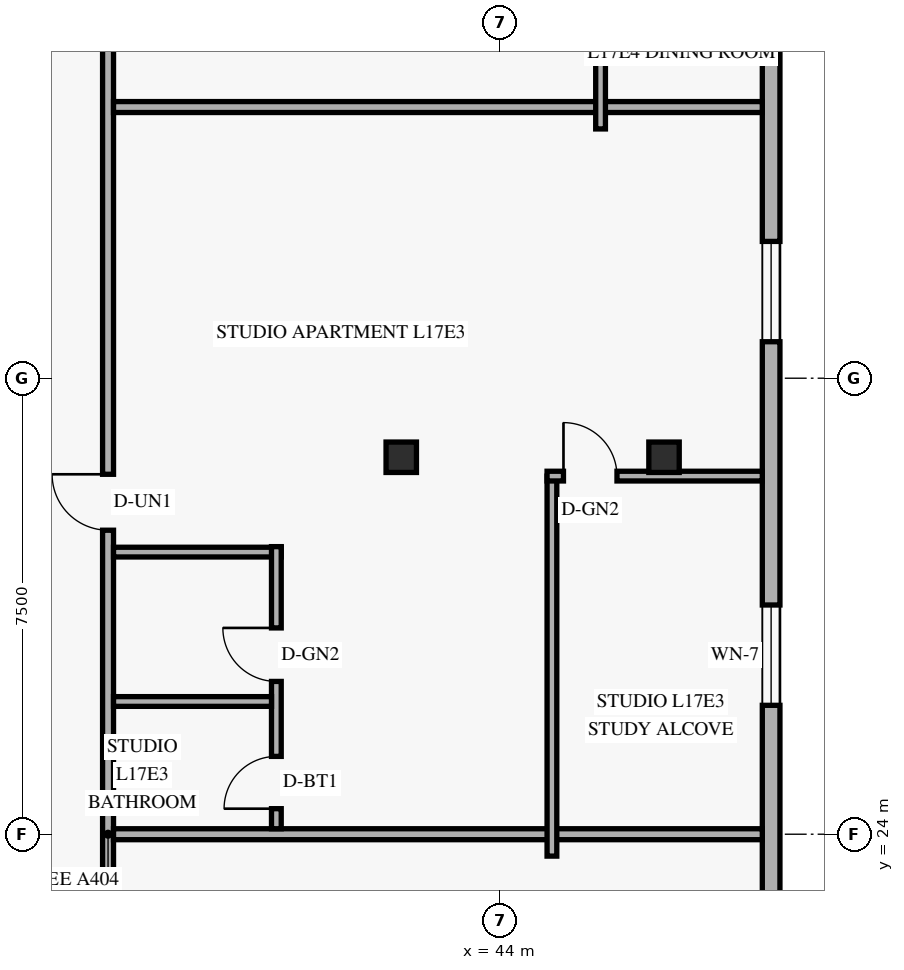
"""IFC4 building model, lengths in metres.
Left out: names, types, materials, properties, quantities, classifications, styles, units other than length and angle.
Written with IfcOpenShell. Run it as: python <this file> out.ifc"""

import sys

from ifc_helpers import new_model, si_unit, direction, frame, frame_2d, origin, origin_2d, place, context, subcontext, project, spatial, rectangle, hollow_rectangle, extrude, element, fill, save


model = new_model("IFC4")
c1 = context("Model", 3, precision=1e-05, world=origin(), true_north=direction((0.0, 1.0)))
c2 = subcontext(c1, "Body", "Model", "MODEL_VIEW")
j1 = project(units=[si_unit("LENGTHUNIT", "METRE"), si_unit("PLANEANGLEUNIT", "RADIAN")], contexts=[c1])
p1 = place(None, origin())
s1 = spatial("IfcSite", under=j1, at=p1, CompositionType="ELEMENT")
p2 = place(p1, origin())
s2 = spatial("IfcBuilding", under=s1, at=p2, CompositionType="ELEMENT")
p3 = place(p2, frame((0.0, 0.0, 67.8)))
s3 = spatial("IfcBuildingStorey", under=s2, at=p3, CompositionType="ELEMENT", Elevation=67.8)
p4 = place(p3, frame((42.309, 30.2, 0.0), z_axis=(0.034973505036, 0.0, 0.999388239847), x_axis=(0.0, 1.0, 0.0)))
e1 = element("IfcColumn", 1, at=p4, inside=s3, PredefinedType="COLUMN", context=c2, shape_type="SweptSolid", body=[
    extrude(hollow_rectangle(XDim=0.5, YDim=0.5, WallThickness=0.022, at=origin_2d()), origin(), (0.0, 0.0, 1.0), 3.602),
])
p5 = place(p3, frame((46.589, 30.2, 0.0), z_axis=(0.057955997462, 0.0, 0.998319138531), x_axis=(0.0, 1.0, 0.0)))
e2 = element("IfcColumn", 2, at=p5, inside=s3, PredefinedType="COLUMN", context=c2, shape_type="SweptSolid", body=[
    extrude(hollow_rectangle(XDim=0.5, YDim=0.5, WallThickness=0.022, at=origin_2d()), origin(), (0.0, 0.0, 1.0), 3.606),
])
p6 = place(p3, frame((48.455, 4.62, 0.0), z_axis=(0.0, 0.0, 1.0), x_axis=(0.0, 1.0, 0.0)))
e3 = element("IfcWall", 3, at=p6, inside=s3, PredefinedType="SOLIDWALL", context=c2, shape_type="SweptSolid", body=[
    extrude(rectangle(XDim=38.76, YDim=0.29, at=frame_2d((19.38, 0.0))), origin(), (0.0, 0.0, 1.0), 3.3),
])
p7 = place(p6, frame((2.885, 0.0, 0.85)))
e4 = element("IfcOpeningElement", 4, at=p7, cuts=e3, PredefinedType="OPENING", context=c2, shape_type="SweptSolid", body=[
    extrude(rectangle(XDim=1.65, YDim=1.6, at=frame_2d((0.825, 0.8))), frame((0.0, 0.155, 0.0), z_axis=(0.0, -1.0, 0.0), x_axis=(1.0, 0.0, 0.0)), (0.0, 0.0, 1.0), 0.31),
])
p8 = place(p6, frame((9.54, 0.0, 0.85)))
e5 = element("IfcOpeningElement", 5, at=p8, cuts=e3, PredefinedType="OPENING", context=c2, shape_type="SweptSolid", body=[
    extrude(rectangle(XDim=1.65, YDim=1.6, at=frame_2d((0.825, 0.8))), frame((0.0, 0.155, 0.0), z_axis=(0.0, -1.0, 0.0), x_axis=(1.0, 0.0, 0.0)), (0.0, 0.0, 1.0), 0.31),
])
p9 = place(p6, frame((15.52, 0.0, 0.85)))
e6 = element("IfcOpeningElement", 6, at=p9, cuts=e3, PredefinedType="OPENING", context=c2, shape_type="SweptSolid", body=[
    extrude(rectangle(XDim=1.65, YDim=1.6, at=frame_2d((0.825, 0.8))), frame((0.0, 0.155, 0.0), z_axis=(0.0, -1.0, 0.0), x_axis=(1.0, 0.0, 0.0)), (0.0, 0.0, 1.0), 0.31),
])
p10 = place(p6, frame((21.5, 0.0, 0.85)))
e7 = element("IfcOpeningElement", 7, at=p10, cuts=e3, PredefinedType="OPENING", context=c2, shape_type="SweptSolid", body=[
    extrude(rectangle(XDim=1.65, YDim=1.6, at=frame_2d((0.825, 0.8))), frame((0.0, 0.155, 0.0), z_axis=(0.0, -1.0, 0.0), x_axis=(1.0, 0.0, 0.0)), (0.0, 0.0, 1.0), 0.31),
])
p11 = place(p6, frame((27.48, 0.0, 0.85)))
e8 = element("IfcOpeningElement", 8, at=p11, cuts=e3, PredefinedType="OPENING", context=c2, shape_type="SweptSolid", body=[
    extrude(rectangle(XDim=1.65, YDim=1.6, at=frame_2d((0.825, 0.8))), frame((0.0, 0.155, 0.0), z_axis=(0.0, -1.0, 0.0), x_axis=(1.0, 0.0, 0.0)), (0.0, 0.0, 1.0), 0.31),
])
p12 = place(p6, frame((34.225, 0.0, 0.85)))
e9 = element("IfcOpeningElement", 9, at=p12, cuts=e3, PredefinedType="OPENING", context=c2, shape_type="SweptSolid", body=[
    extrude(rectangle(XDim=1.65, YDim=1.6, at=frame_2d((0.825, 0.8))), frame((0.0, 0.155, 0.0), z_axis=(0.0, -1.0, 0.0), x_axis=(1.0, 0.0, 0.0)), (0.0, 0.0, 1.0), 0.31),
])
p13 = place(p3, frame((37.55, 1.29, 0.0), z_axis=(0.0, 0.0, 1.0), x_axis=(0.0, 1.0, 0.0)))
e10 = element("IfcWall", 10, at=p13, inside=s3, PredefinedType="STANDARD", context=c2, shape_type="SweptSolid", body=[
    extrude(rectangle(XDim=45.42, YDim=0.18, at=frame_2d((22.71, 0.0))), origin(), (0.0, 0.0, 1.0), 2.589),
])
p14 = place(p13, frame((4.81, 0.0, 0.0)))
e11 = element("IfcOpeningElement", 11, at=p14, cuts=e10, PredefinedType="OPENING", context=c2, shape_type="SweptSolid", body=[
    extrude(rectangle(XDim=0.92, YDim=2.15, at=frame_2d((0.46, 1.075))), frame((0.0, 0.1, 0.0), z_axis=(0.0, -1.0, 0.0), x_axis=(1.0, 0.0, 0.0)), (0.0, 0.0, 1.0), 0.2),
])
p15 = place(p13, frame((15.75, 0.0, 0.0)))
e12 = element("IfcOpeningElement", 12, at=p15, cuts=e10, PredefinedType="OPENING", context=c2, shape_type="SweptSolid", body=[
    extrude(rectangle(XDim=0.92, YDim=2.15, at=frame_2d((0.46, 1.075))), frame((0.0, 0.1, 0.0), z_axis=(0.0, -1.0, 0.0), x_axis=(1.0, 0.0, 0.0)), (0.0, 0.0, 1.0), 0.2),
])
p16 = place(p13, frame((27.71, 0.0, 0.0)))
e13 = element("IfcOpeningElement", 13, at=p16, cuts=e10, PredefinedType="OPENING", context=c2, shape_type="SweptSolid", body=[
    extrude(rectangle(XDim=0.92, YDim=2.15, at=frame_2d((0.46, 1.075))), frame((0.0, 0.1, 0.0), z_axis=(0.0, -1.0, 0.0), x_axis=(1.0, 0.0, 0.0)), (0.0, 0.0, 1.0), 0.2),
])
p17 = place(p13, frame((36.422, 0.0, 0.0)))
e14 = element("IfcOpeningElement", 14, at=p17, cuts=e10, PredefinedType="OPENING", context=c2, shape_type="SweptSolid", body=[
    extrude(rectangle(XDim=0.92, YDim=2.15, at=frame_2d((0.46, 1.075))), frame((0.0, 0.1, 0.0), z_axis=(0.0, -1.0, 0.0), x_axis=(1.0, 0.0, 0.0)), (0.0, 0.0, 1.0), 0.2),
])
p18 = place(p3, frame((37.64, 24.0, 0.0), z_axis=(0.0, 0.0, 1.0), x_axis=(1.0, 0.0, 0.0)))
e15 = element("IfcWall", 15, at=p18, inside=s3, PredefinedType="PARTITIONING", context=c2, shape_type="SweptSolid", body=[
    extrude(rectangle(XDim=10.67, YDim=0.18, at=frame_2d((5.335, 0.0))), origin(), (0.0, 0.0, 1.0), 2.589),
])
p19 = place(p3, frame((37.64, 28.64, 0.0), z_axis=(0.0, 0.0, 1.0), x_axis=(1.0, 0.0, 0.0)))
e16 = element("IfcWall", 16, at=p19, inside=s3, PredefinedType="PLUMBINGWALL", context=c2, shape_type="SweptSolid", body=[
    extrude(rectangle(XDim=2.758, YDim=0.16, at=frame_2d((1.379, 0.0))), origin(), (0.0, 0.0, 1.0), 3.3),
])
p20 = place(p3, frame((40.318, 24.09, 0.0), z_axis=(0.0, 0.0, 1.0), x_axis=(0.0, 1.0, 0.0)))
e17 = element("IfcWall", 17, at=p20, inside=s3, PredefinedType="PLUMBINGWALL", context=c2, shape_type="SweptSolid", body=[
    extrude(rectangle(XDim=4.64, YDim=0.16, at=frame_2d((2.32, 0.0))), origin(), (0.0, 0.0, 1.0), 3.3),
])
p21 = place(p20, frame((0.33, 0.0, 0.0)))
e18 = element("IfcOpeningElement", 18, at=p21, cuts=e17, PredefinedType="OPENING", context=c2, shape_type="SweptSolid", body=[
    extrude(rectangle(XDim=0.86, YDim=2.12, at=frame_2d((0.43, 1.06))), frame((0.0, 0.09, 0.0), z_axis=(0.0, -1.0, 0.0), x_axis=(1.0, 0.0, 0.0)), (0.0, 0.0, 1.0), 0.18),
])
p22 = place(p20, frame((2.423, 0.0, 0.0)))
e19 = element("IfcOpeningElement", 19, at=p22, cuts=e17, PredefinedType="OPENING", context=c2, shape_type="SweptSolid", body=[
    extrude(rectangle(XDim=0.88, YDim=2.12, at=frame_2d((0.44, 1.06))), frame((0.0, 0.09, 0.0), z_axis=(0.0, -1.0, 0.0), x_axis=(1.0, 0.0, 0.0)), (0.0, 0.0, 1.0), 0.18),
])
p23 = place(p3, frame((37.64, 26.183, 0.0), z_axis=(0.0, 0.0, 1.0), x_axis=(1.0, 0.0, 0.0)))
e20 = element("IfcWall", 20, at=p23, inside=s3, PredefinedType="PLUMBINGWALL", context=c2, shape_type="SweptSolid", body=[
    extrude(rectangle(XDim=2.598, YDim=0.16, at=frame_2d((1.299, 0.0))), origin(), (0.0, 0.0, 1.0), 3.3),
])
p24 = place(p3, frame((44.85, 23.64, 0.0), z_axis=(0.0, 0.0, 1.0), x_axis=(0.0, 1.0, 0.0)))
e21 = element("IfcWall", 21, at=p24, inside=s3, PredefinedType="PARTITIONING", context=c2, shape_type="SweptSolid", body=[
    extrude(rectangle(XDim=6.25, YDim=0.16, at=frame_2d((3.125, 0.0))), origin(), (0.0, 0.0, 1.0), 3.3),
])
p25 = place(p3, frame((44.77, 29.89, 0.0), z_axis=(0.0, 0.0, 1.0), x_axis=(1.0, 0.0, 0.0)))
e22 = element("IfcWall", 22, at=p25, inside=s3, PredefinedType="PARTITIONING", context=c2, shape_type="SweptSolid", body=[
    extrude(rectangle(XDim=3.54, YDim=0.16, at=frame_2d((1.77, 0.0))), origin(), (0.0, 0.0, 1.0), 2.749),
])
p26 = place(p25, frame((0.27, 0.0, 0.0)))
e23 = element("IfcOpeningElement", 23, at=p26, cuts=e22, PredefinedType="OPENING", context=c2, shape_type="SweptSolid", body=[
    extrude(rectangle(XDim=0.88, YDim=2.12, at=frame_2d((0.44, 1.06))), frame((0.0, 0.09, 0.0), z_axis=(0.0, -1.0, 0.0), x_axis=(1.0, 0.0, 0.0)), (0.0, 0.0, 1.0), 0.18),
])
p27 = place(p3, frame((37.64, 35.96, 0.0), z_axis=(0.0, 0.0, 1.0), x_axis=(1.0, 0.0, 0.0)))
e24 = element("IfcWall", 24, at=p27, inside=s3, PredefinedType="PARTITIONING", context=c2, shape_type="SweptSolid", body=[
    extrude(rectangle(XDim=10.67, YDim=0.18, at=frame_2d((5.335, 0.0))), origin(), (0.0, 0.0, 1.0), 2.589),
])
p28 = place(p3, frame((45.65, 35.6, 0.0), z_axis=(0.0, 0.0, 1.0), x_axis=(0.0, 1.0, 0.0)))
e25 = element("IfcWall", 25, at=p28, inside=s3, PredefinedType="PARTITIONING", context=c2, shape_type="SweptSolid", body=[
    extrude(rectangle(XDim=8.256, YDim=0.16, at=frame_2d((4.128, 0.0))), origin(), (0.0, 0.0, 1.0), 2.589),
])
p29 = place(p28, frame((3.788, 0.0, 0.0)))
e26 = element("IfcOpeningElement", 26, at=p29, cuts=e25, PredefinedType="OPENING", context=c2, shape_type="SweptSolid", body=[
    extrude(rectangle(XDim=0.95, YDim=2.15, at=frame_2d((0.475, 1.075))), frame((0.0, 0.09, 0.0), z_axis=(0.0, -1.0, 0.0), x_axis=(1.0, 0.0, 0.0)), (0.0, 0.0, 1.0), 0.18),
])
p30 = place(p10, origin())
e27 = element("IfcWindow", 27, at=p30, inside=s3, PartitioningType="SINGLE_PANEL", PredefinedType="WINDOW", context=c2, shape_type="SweptSolid", body=[
    extrude(rectangle(XDim=1.65, YDim=1.6, at=frame_2d((0.825, 0.8))), frame((0.0, 0.03, 0.0), z_axis=(0.0, -1.0, 0.0), x_axis=(1.0, 0.0, 0.0)), (0.0, 0.0, 1.0), 0.06),
])
fill(e7, e27)
p31 = place(p11, origin())
e28 = element("IfcWindow", 28, at=p31, inside=s3, PartitioningType="SINGLE_PANEL", PredefinedType="WINDOW", context=c2, shape_type="SweptSolid", body=[
    extrude(rectangle(XDim=1.65, YDim=1.6, at=frame_2d((0.825, 0.8))), frame((0.0, 0.03, 0.0), z_axis=(0.0, -1.0, 0.0), x_axis=(1.0, 0.0, 0.0)), (0.0, 0.0, 1.0), 0.06),
])
fill(e8, e28)
p32 = place(p26, origin())
e29 = element("IfcDoor", 29, at=p32, inside=s3, OperationType="SINGLE_SWING_LEFT", PredefinedType="DOOR", context=c2, shape_type="SweptSolid", body=[
    extrude(rectangle(XDim=0.88, YDim=2.12, at=frame_2d((0.44, 1.06))), frame((0.0, 0.025, 0.0), z_axis=(0.0, -1.0, 0.0), x_axis=(1.0, 0.0, 0.0)), (0.0, 0.0, 1.0), 0.05),
])
fill(e23, e29)
p33 = place(p16, origin())
e30 = element("IfcDoor", 30, at=p33, inside=s3, OperationType="SINGLE_SWING_RIGHT", PredefinedType="DOOR", context=c2, shape_type="SweptSolid", body=[
    extrude(rectangle(XDim=0.92, YDim=2.15, at=frame_2d((0.46, 1.075))), frame((0.0, 0.025, 0.0), z_axis=(0.0, -1.0, 0.0), x_axis=(1.0, 0.0, 0.0)), (0.0, 0.0, 1.0), 0.05),
])
fill(e13, e30)
p34 = place(p21, origin())
e31 = element("IfcDoor", 31, at=p34, inside=s3, OperationType="SINGLE_SWING_LEFT", PredefinedType="DOOR", context=c2, shape_type="SweptSolid", body=[
    extrude(rectangle(XDim=0.86, YDim=2.12, at=frame_2d((0.43, 1.06))), frame((0.0, 0.025, 0.0), z_axis=(0.0, -1.0, 0.0), x_axis=(1.0, 0.0, 0.0)), (0.0, 0.0, 1.0), 0.05),
])
fill(e18, e31)
p35 = place(p22, origin())
e32 = element("IfcDoor", 32, at=p35, inside=s3, OperationType="SINGLE_SWING_RIGHT", PredefinedType="DOOR", context=c2, shape_type="SweptSolid", body=[
    extrude(rectangle(XDim=0.88, YDim=2.12, at=frame_2d((0.44, 1.06))), frame((0.0, 0.025, 0.0), z_axis=(0.0, -1.0, 0.0), x_axis=(1.0, 0.0, 0.0)), (0.0, 0.0, 1.0), 0.05),
])
fill(e19, e32)
save(model, sys.argv[1])
